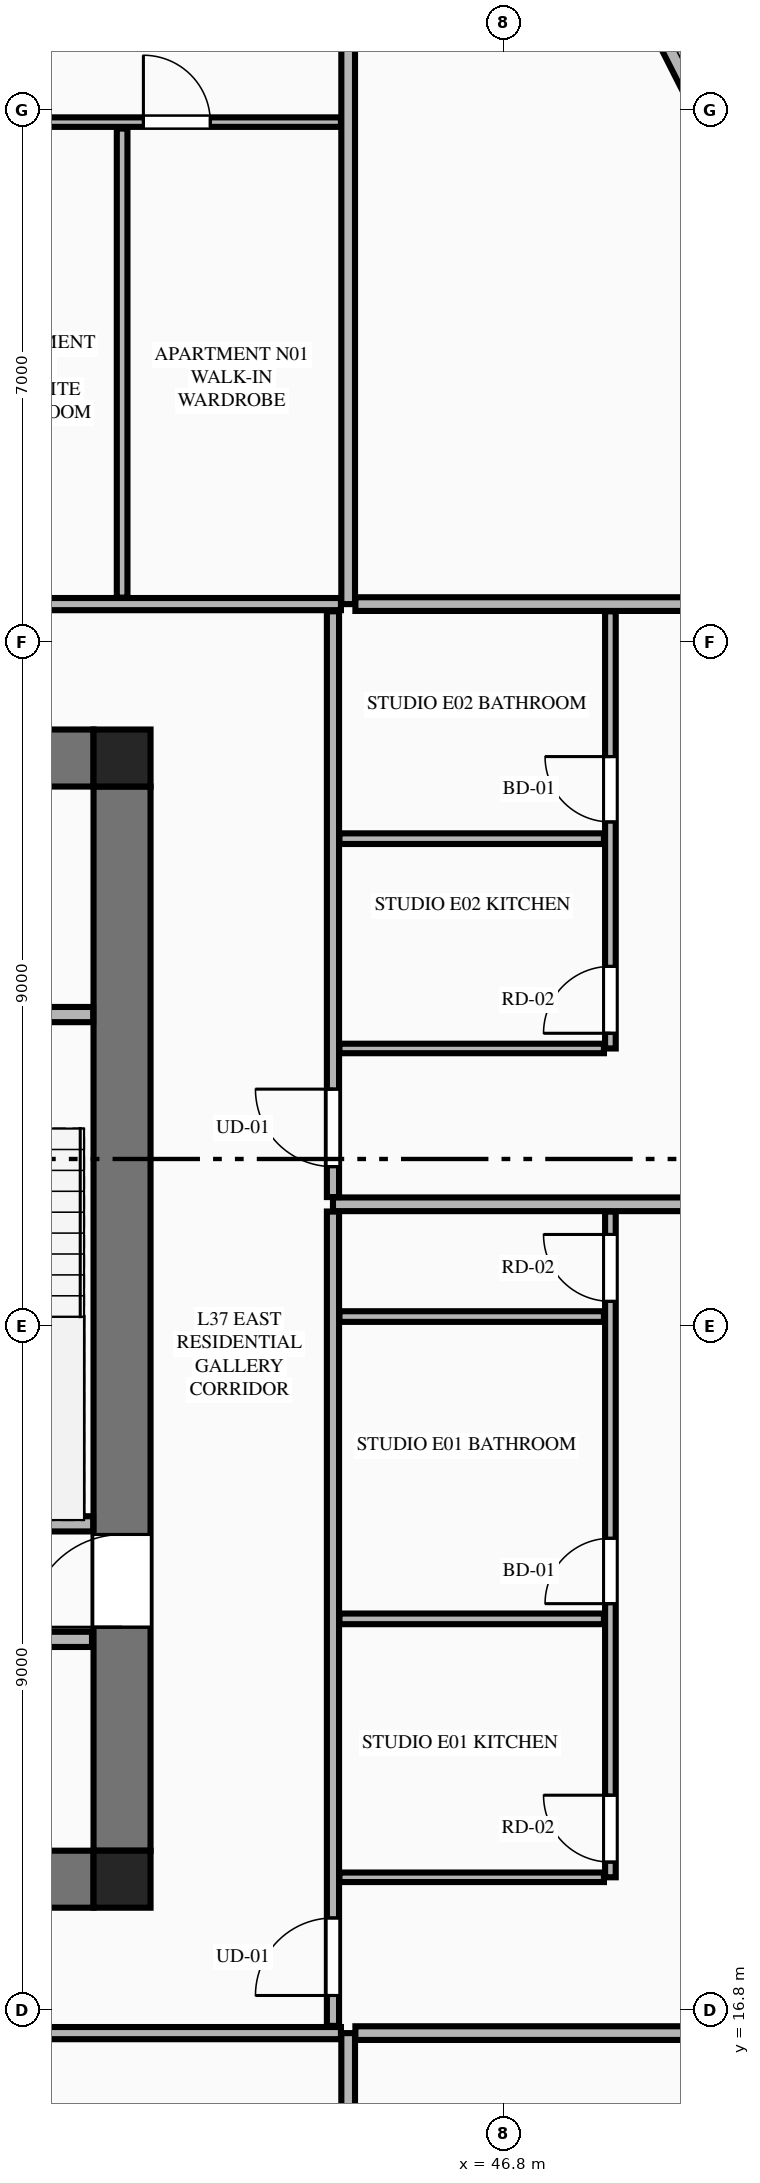
"""IFC4 building model, lengths in metres.
Left out: names, types, materials, properties, quantities, classifications, styles, units other than length and angle.
Written with IfcOpenShell. Run it as: python <this file> out.ifc"""

import sys

from ifc_helpers import new_model, si_unit, direction, frame, frame_2d, origin, origin_2d, place, context, subcontext, project, spatial, rectangle, extrude, element, fill, save


model = new_model("IFC4")
c1 = context("Model", 3, precision=1e-05, world=origin(), true_north=direction((0.0, 1.0)))
c2 = subcontext(c1, "Body", "Model", "MODEL_VIEW")
j1 = project(units=[si_unit("LENGTHUNIT", "METRE"), si_unit("PLANEANGLEUNIT", "RADIAN")], contexts=[c1])
p1 = place(None, origin())
s1 = spatial("IfcSite", under=j1, at=p1, CompositionType="ELEMENT")
p2 = place(p1, origin())
s2 = spatial("IfcBuilding", under=s1, at=p2, CompositionType="ELEMENT")
p3 = place(p2, frame((0.0, 0.0, 141.0)))
s3 = spatial("IfcBuildingStorey", under=s2, at=p3, CompositionType="ELEMENT", Elevation=141.0)
for number, where, z_axis, x_axis in (
    (1, (41.775, 18.525, 0.0), (0.0, 0.0, 1.0), (1.0, 0.0, 0.0)),
    (2, (41.775, 33.275, 0.0), (0.0, 0.0, 1.0), (1.0, 0.0, 0.0)),
):
    element("IfcColumn", number, at=place(p3, frame(where, z_axis=z_axis, x_axis=x_axis)), inside=s3, PredefinedType="COLUMN", context=c2, shape_type="SweptSolid", body=[
        extrude(rectangle(XDim=0.75, YDim=0.75, at=origin_2d()), origin(), (0.0, 0.0, 1.0), 3.55),
    ])
for number, where, z_axis, x_axis in (
    (3, (23.4, 18.525, 0.0), (0.0, 0.0, 1.0), (1.0, 0.0, 0.0)),
    (4, (23.4, 33.275, 0.0), (0.0, 0.0, 1.0), (1.0, 0.0, 0.0)),
):
    element("IfcWall", number, at=place(p3, frame(where, z_axis=z_axis, x_axis=x_axis)), inside=s3, PredefinedType="SHEAR", context=c2, shape_type="SweptSolid", body=[
        extrude(rectangle(XDim=18.0, YDim=0.75, at=frame_2d((9.0, 0.0))), origin(), (0.0, 0.0, 1.0), 3.34),
    ])
p4 = place(p3, frame((41.775, 18.9, 0.0), z_axis=(0.0, 0.0, 1.0), x_axis=(0.0, 1.0, 0.0)))
e5 = element("IfcWall", 5, at=p4, inside=s3, PredefinedType="SHEAR", context=c2, shape_type="SweptSolid", body=[
    extrude(rectangle(XDim=14.0, YDim=0.75, at=frame_2d((7.0, 0.0))), origin(), (0.0, 0.0, 1.0), 3.34),
])
p5 = place(p4, frame((2.94, 0.0, 0.0)))
e6 = element("IfcOpeningElement", 6, at=p5, cuts=e5, PredefinedType="OPENING", context=c2, shape_type="SweptSolid", body=[
    extrude(rectangle(XDim=1.22, YDim=2.25, at=frame_2d((0.61, 1.125))), frame((0.0, 0.385, 0.0), z_axis=(0.0, -1.0, 0.0), x_axis=(1.0, 0.0, 0.0)), (0.0, 0.0, 1.0), 0.77),
])
p6 = place(p3, frame((38.125, 23.2, 0.0), z_axis=(0.0, 0.0, 1.0), x_axis=(1.0, 0.0, 0.0)))
e7 = element("IfcWall", 7, at=p6, inside=s3, PredefinedType="PLUMBINGWALL", context=c2, shape_type="SweptSolid", body=[
    extrude(rectangle(XDim=3.27, YDim=0.2, at=frame_2d((1.635, 0.0))), origin(), (0.0, 0.0, 1.0), 3.34),
])
p7 = place(p3, frame((38.125, 29.9, 0.0), z_axis=(0.0, 0.0, 1.0), x_axis=(1.0, 0.0, 0.0)))
e8 = element("IfcWall", 8, at=p7, inside=s3, PredefinedType="PLUMBINGWALL", context=c2, shape_type="SweptSolid", body=[
    extrude(rectangle(XDim=3.27, YDim=0.2, at=frame_2d((1.635, 0.0))), origin(), (0.0, 0.0, 1.0), 3.34),
])
p8 = place(p7, frame((0.5, 0.0, 0.0)))
e9 = element("IfcOpeningElement", 9, at=p8, cuts=e8, PredefinedType="OPENING", context=c2, shape_type="SweptSolid", body=[
    extrude(rectangle(XDim=0.85, YDim=2.05, at=frame_2d((0.425, 1.025))), frame((0.0, 0.11, 0.0), z_axis=(0.0, -1.0, 0.0), x_axis=(1.0, 0.0, 0.0)), (0.0, 0.0, 1.0), 0.22),
])
p9 = place(p3, frame((23.42, 21.68, 0.0), z_axis=(0.0, 0.0, 1.0), x_axis=(1.0, 0.0, 0.0)))
e10 = element("IfcWall", 10, at=p9, inside=s3, PredefinedType="PLUMBINGWALL", context=c2, shape_type="SweptSolid", body=[
    extrude(rectangle(XDim=17.96, YDim=0.2, at=frame_2d((8.98, 0.0))), origin(), (0.0, 0.0, 1.0), 3.34),
])
p10 = place(p9, frame((11.6, 0.0, 0.0)))
e11 = element("IfcOpeningElement", 11, at=p10, cuts=e10, PredefinedType="OPENING", context=c2, shape_type="SweptSolid", body=[
    extrude(rectangle(XDim=1.1, YDim=2.2, at=frame_2d((0.55, 1.1))), frame((0.0, 0.11, 0.0), z_axis=(0.0, -1.0, 0.0), x_axis=(1.0, 0.0, 0.0)), (0.0, 0.0, 1.0), 0.22),
])
p11 = place(p9, frame((0.41, 0.0, 0.0)))
e12 = element("IfcOpeningElement", 12, at=p11, cuts=e10, PredefinedType="OPENING", context=c2, shape_type="SweptSolid", body=[
    extrude(rectangle(XDim=0.85, YDim=2.05, at=frame_2d((0.425, 1.025))), frame((0.0, 0.11, 0.0), z_axis=(0.0, -1.0, 0.0), x_axis=(1.0, 0.0, 0.0)), (0.0, 0.0, 1.0), 0.22),
])
p12 = place(p9, frame((4.13, 0.0, 0.0)))
e13 = element("IfcOpeningElement", 13, at=p12, cuts=e10, PredefinedType="OPENING", context=c2, shape_type="SweptSolid", body=[
    extrude(rectangle(XDim=0.85, YDim=2.05, at=frame_2d((0.425, 1.025))), frame((0.0, 0.11, 0.0), z_axis=(0.0, -1.0, 0.0), x_axis=(1.0, 0.0, 0.0)), (0.0, 0.0, 1.0), 0.22),
])
p13 = place(p9, frame((7.83, 0.0, 0.0)))
e14 = element("IfcOpeningElement", 14, at=p13, cuts=e10, PredefinedType="OPENING", context=c2, shape_type="SweptSolid", body=[
    extrude(rectangle(XDim=0.85, YDim=2.05, at=frame_2d((0.425, 1.025))), frame((0.0, 0.11, 0.0), z_axis=(0.0, -1.0, 0.0), x_axis=(1.0, 0.0, 0.0)), (0.0, 0.0, 1.0), 0.22),
])
p14 = place(p9, frame((13.78, 0.0, 0.0)))
e15 = element("IfcOpeningElement", 15, at=p14, cuts=e10, PredefinedType="OPENING", context=c2, shape_type="SweptSolid", body=[
    extrude(rectangle(XDim=0.85, YDim=2.05, at=frame_2d((0.425, 1.025))), frame((0.0, 0.11, 0.0), z_axis=(0.0, -1.0, 0.0), x_axis=(1.0, 0.0, 0.0)), (0.0, 0.0, 1.0), 0.22),
])
p15 = place(p9, frame((16.13, 0.0, 0.0)))
e16 = element("IfcOpeningElement", 16, at=p15, cuts=e10, PredefinedType="OPENING", context=c2, shape_type="SweptSolid", body=[
    extrude(rectangle(XDim=0.85, YDim=2.05, at=frame_2d((0.425, 1.025))), frame((0.0, 0.11, 0.0), z_axis=(0.0, -1.0, 0.0), x_axis=(1.0, 0.0, 0.0)), (0.0, 0.0, 1.0), 0.22),
])
p16 = place(p3, frame((50.251, 40.251, 0.0), z_axis=(0.0, 0.0, 1.0), x_axis=(-0.451548465867, 0.892246593142, 0.0)))
e17 = element("IfcWall", 17, at=p16, inside=s3, PredefinedType="STANDARD", context=c2, shape_type="SweptSolid", body=[
    extrude(rectangle(XDim=5.04, YDim=0.34, at=frame_2d((2.52, 0.0))), origin(), (0.0, 0.0, 1.0), 2.797),
])
p17 = place(p16, frame((1.97, 0.0, 0.75)))
e18 = element("IfcOpeningElement", 18, at=p17, cuts=e17, PredefinedType="OPENING", context=c2, shape_type="SweptSolid", body=[
    extrude(rectangle(XDim=1.1, YDim=1.897, at=frame_2d((0.55, 0.948))), frame((0.0, 0.18, 0.0), z_axis=(0.0, -1.0, 0.0), x_axis=(1.0, 0.0, 0.0)), (0.0, 0.0, 1.0), 0.36),
])
p18 = place(p3, frame((44.75, 4.105, 0.0), z_axis=(0.0, 0.0, 1.0), x_axis=(0.0, 1.0, 0.0)))
e19 = element("IfcWall", 19, at=p18, inside=s3, PredefinedType="PARTITIONING", context=c2, shape_type="SweptSolid", body=[
    extrude(rectangle(XDim=12.395, YDim=0.18, at=frame_2d((6.198, 0.0))), origin(), (0.0, 0.0, 1.0), 3.34),
])
p19 = place(p3, frame((20.145, 16.5, 0.0), z_axis=(0.0, 0.0, 1.0), x_axis=(1.0, 0.0, 0.0)))
e20 = element("IfcWall", 20, at=p19, inside=s3, PredefinedType="PARTITIONING", context=c2, shape_type="SweptSolid", body=[
    extrude(rectangle(XDim=24.51, YDim=0.16, at=frame_2d((12.255, 0.0))), origin(), (0.0, 0.0, 1.0), 3.34),
])
p20 = place(p19, frame((0.405, 0.0, 0.0)))
e21 = element("IfcOpeningElement", 21, at=p20, cuts=e20, PredefinedType="OPENING", context=c2, shape_type="SweptSolid", body=[
    extrude(rectangle(XDim=1.35, YDim=2.35, at=frame_2d((0.675, 1.175))), frame((0.0, 0.09, 0.0), z_axis=(0.0, -1.0, 0.0), x_axis=(1.0, 0.0, 0.0)), (0.0, 0.0, 1.0), 0.18),
])
p21 = place(p3, frame((44.75, 35.3, 0.0), z_axis=(0.0, 0.0, 1.0), x_axis=(0.0, 1.0, 0.0)))
e22 = element("IfcWall", 22, at=p21, inside=s3, PredefinedType="PARTITIONING", context=c2, shape_type="SweptSolid", body=[
    extrude(rectangle(XDim=12.195, YDim=0.18, at=frame_2d((6.098, 0.0))), origin(), (0.0, 0.0, 1.0), 3.34),
])
p22 = place(p3, frame((20.145, 35.3, 0.0), z_axis=(0.0, 0.0, 1.0), x_axis=(1.0, 0.0, 0.0)))
e23 = element("IfcWall", 23, at=p22, inside=s3, PredefinedType="PARTITIONING", context=c2, shape_type="SweptSolid", body=[
    extrude(rectangle(XDim=24.51, YDim=0.16, at=frame_2d((12.255, 0.0))), origin(), (0.0, 0.0, 1.0), 3.34),
])
p23 = place(p22, frame((0.405, 0.0, 0.0)))
e24 = element("IfcOpeningElement", 24, at=p23, cuts=e23, PredefinedType="OPENING", context=c2, shape_type="SweptSolid", body=[
    extrude(rectangle(XDim=1.35, YDim=2.35, at=frame_2d((0.675, 1.175))), frame((0.0, 0.09, 0.0), z_axis=(0.0, -1.0, 0.0), x_axis=(1.0, 0.0, 0.0)), (0.0, 0.0, 1.0), 0.18),
])
p24 = place(p3, frame((34.643, 41.641, 0.0), z_axis=(0.0, 0.0, 1.0), x_axis=(1.0, 0.0, 0.0)))
e25 = element("IfcWall", 25, at=p24, inside=s3, PredefinedType="PARTITIONING", context=c2, shape_type="SweptSolid", body=[
    extrude(rectangle(XDim=10.012, YDim=0.125, at=frame_2d((5.006, 0.0))), origin(), (0.0, 0.0, 1.0), 3.34),
])
p25 = place(p24, frame((5.18, 0.0, 0.0)))
e26 = element("IfcOpeningElement", 26, at=p25, cuts=e25, PredefinedType="OPENING", context=c2, shape_type="SweptSolid", body=[
    extrude(rectangle(XDim=0.86, YDim=2.1, at=frame_2d((0.43, 1.05))), frame((0.0, 0.073, 0.0), z_axis=(0.0, -1.0, 0.0), x_axis=(1.0, 0.0, 0.0)), (0.0, 0.0, 1.0), 0.145),
])
p26 = place(p24, frame((7.413, 0.0, 0.0)))
e27 = element("IfcOpeningElement", 27, at=p26, cuts=e25, PredefinedType="OPENING", context=c2, shape_type="SweptSolid", body=[
    extrude(rectangle(XDim=0.88, YDim=2.15, at=frame_2d((0.44, 1.075))), frame((0.0, 0.073, 0.0), z_axis=(0.0, -1.0, 0.0), x_axis=(1.0, 0.0, 0.0)), (0.0, 0.0, 1.0), 0.145),
])
p27 = place(p24, frame((0.3, 0.0, 0.0)))
e28 = element("IfcOpeningElement", 28, at=p27, cuts=e25, PredefinedType="OPENING", context=c2, shape_type="SweptSolid", body=[
    extrude(rectangle(XDim=0.88, YDim=2.15, at=frame_2d((0.44, 1.075))), frame((0.0, 0.073, 0.0), z_axis=(0.0, -1.0, 0.0), x_axis=(1.0, 0.0, 0.0)), (0.0, 0.0, 1.0), 0.145),
])
p28 = place(p3, frame((41.776, 35.385, 0.0), z_axis=(0.0, 0.0, 1.0), x_axis=(0.0, 1.0, 0.0)))
e29 = element("IfcWall", 29, at=p28, inside=s3, PredefinedType="PLUMBINGWALL", context=c2, shape_type="SweptSolid", body=[
    extrude(rectangle(XDim=6.171, YDim=0.14, at=frame_2d((3.085, 0.0))), origin(), (0.0, 0.0, 1.0), 2.722),
])
p29 = place(p3, frame((44.845, 16.5, 0.0), z_axis=(0.0, 0.0, 1.0), x_axis=(1.0, 0.0, 0.0)))
e30 = element("IfcWall", 30, at=p29, inside=s3, PredefinedType="PARTITIONING", context=c2, shape_type="SweptSolid", body=[
    extrude(rectangle(XDim=7.77, YDim=0.18, at=frame_2d((3.885, 0.0))), origin(), (0.0, 0.0, 1.0), 3.34),
])
p30 = place(p3, frame((44.845, 35.3, 0.0), z_axis=(0.0, 0.0, 1.0), x_axis=(1.0, 0.0, 0.0)))
e31 = element("IfcWall", 31, at=p30, inside=s3, PredefinedType="PARTITIONING", context=c2, shape_type="SweptSolid", body=[
    extrude(rectangle(XDim=7.669, YDim=0.18, at=frame_2d((3.834, 0.0))), origin(), (0.0, 0.0, 1.0), 3.34),
])
p31 = place(p3, frame((44.55, 16.595, 0.0), z_axis=(0.0, 0.0, 1.0), x_axis=(0.0, 1.0, 0.0)))
e32 = element("IfcWall", 32, at=p31, inside=s3, PredefinedType="PARTITIONING", context=c2, shape_type="SweptSolid", body=[
    extrude(rectangle(XDim=10.714, YDim=0.16, at=frame_2d((5.357, 0.0))), origin(), (0.0, 0.0, 1.0), 3.34),
])
p32 = place(p31, frame((0.4, 0.0, 0.0)))
e33 = element("IfcOpeningElement", 33, at=p32, cuts=e32, PredefinedType="OPENING", context=c2, shape_type="SweptSolid", body=[
    extrude(rectangle(XDim=1.02, YDim=2.25, at=frame_2d((0.51, 1.125))), frame((0.0, 0.09, 0.0), z_axis=(0.0, -1.0, 0.0), x_axis=(1.0, 0.0, 0.0)), (0.0, 0.0, 1.0), 0.18),
])
p33 = place(p3, frame((44.635, 18.55, 0.0), z_axis=(0.0, 0.0, 1.0), x_axis=(1.0, 0.0, 0.0)))
e34 = element("IfcWall", 34, at=p33, inside=s3, PredefinedType="PARTITIONING", context=c2, shape_type="SweptSolid", body=[
    extrude(rectangle(XDim=3.48, YDim=0.125, at=frame_2d((1.74, 0.0))), origin(), (0.0, 0.0, 1.0), 2.722),
])
p34 = place(p3, frame((48.2, 18.55, 0.0), z_axis=(0.0, 0.0, 1.0), x_axis=(0.0, 1.0, 0.0)))
e35 = element("IfcWall", 35, at=p34, inside=s3, PredefinedType="PLUMBINGWALL", context=c2, shape_type="SweptSolid", body=[
    extrude(rectangle(XDim=8.759, YDim=0.14, at=frame_2d((4.379, 0.0))), origin(), (0.0, 0.0, 1.0), 3.34),
])
p35 = place(p34, frame((3.6, 0.0, 0.0)))
e36 = element("IfcOpeningElement", 36, at=p35, cuts=e35, PredefinedType="OPENING", context=c2, shape_type="SweptSolid", body=[
    extrude(rectangle(XDim=0.86, YDim=2.1, at=frame_2d((0.43, 1.05))), frame((0.0, 0.08, 0.0), z_axis=(0.0, -1.0, 0.0), x_axis=(1.0, 0.0, 0.0)), (0.0, 0.0, 1.0), 0.16),
])
p36 = place(p34, frame((7.577, 0.0, 0.0)))
e37 = element("IfcOpeningElement", 37, at=p36, cuts=e35, PredefinedType="OPENING", context=c2, shape_type="SweptSolid", body=[
    extrude(rectangle(XDim=0.88, YDim=2.15, at=frame_2d((0.44, 1.075))), frame((0.0, 0.08, 0.0), z_axis=(0.0, -1.0, 0.0), x_axis=(1.0, 0.0, 0.0)), (0.0, 0.0, 1.0), 0.16),
])
p37 = place(p34, frame((0.2, 0.0, 0.0)))
e38 = element("IfcOpeningElement", 38, at=p37, cuts=e35, PredefinedType="OPENING", context=c2, shape_type="SweptSolid", body=[
    extrude(rectangle(XDim=0.88, YDim=2.15, at=frame_2d((0.44, 1.075))), frame((0.0, 0.08, 0.0), z_axis=(0.0, -1.0, 0.0), x_axis=(1.0, 0.0, 0.0)), (0.0, 0.0, 1.0), 0.16),
])
for number, where, z_axis, x_axis in (
    (39, (44.635, 21.95, 0.0), (0.0, 0.0, 1.0), (1.0, 0.0, 0.0)),
    (40, (44.635, 25.927, 0.0), (0.0, 0.0, 1.0), (1.0, 0.0, 0.0)),
):
    element("IfcWall", number, at=place(p3, frame(where, z_axis=z_axis, x_axis=x_axis)), inside=s3, PredefinedType="PLUMBINGWALL", context=c2, shape_type="SweptSolid", body=[
        extrude(rectangle(XDim=3.48, YDim=0.14, at=frame_2d((1.74, 0.0))), origin(), (0.0, 0.0, 1.0), 3.34),
    ])
p38 = place(p3, frame((44.55, 27.404, 0.0), z_axis=(0.0, 0.0, 1.0), x_axis=(1.0, 0.0, 0.0)))
e41 = element("IfcWall", 41, at=p38, inside=s3, PredefinedType="PARTITIONING", context=c2, shape_type="SweptSolid", body=[
    extrude(rectangle(XDim=11.959, YDim=0.18, at=frame_2d((5.979, 0.0))), origin(), (0.0, 0.0, 1.0), 3.34),
])
p39 = place(p3, frame((44.55, 27.499, 0.0), z_axis=(0.0, 0.0, 1.0), x_axis=(0.0, 1.0, 0.0)))
e42 = element("IfcWall", 42, at=p39, inside=s3, PredefinedType="PARTITIONING", context=c2, shape_type="SweptSolid", body=[
    extrude(rectangle(XDim=7.706, YDim=0.16, at=frame_2d((3.853, 0.0))), origin(), (0.0, 0.0, 1.0), 3.34),
])
p40 = place(p39, frame((0.4, 0.0, 0.0)))
e43 = element("IfcOpeningElement", 43, at=p40, cuts=e42, PredefinedType="OPENING", context=c2, shape_type="SweptSolid", body=[
    extrude(rectangle(XDim=1.02, YDim=2.25, at=frame_2d((0.51, 1.125))), frame((0.0, 0.09, 0.0), z_axis=(0.0, -1.0, 0.0), x_axis=(1.0, 0.0, 0.0)), (0.0, 0.0, 1.0), 0.18),
])
p41 = place(p3, frame((44.635, 29.454, 0.0), z_axis=(0.0, 0.0, 1.0), x_axis=(1.0, 0.0, 0.0)))
e44 = element("IfcWall", 44, at=p41, inside=s3, PredefinedType="PARTITIONING", context=c2, shape_type="SweptSolid", body=[
    extrude(rectangle(XDim=3.48, YDim=0.125, at=frame_2d((1.74, 0.0))), origin(), (0.0, 0.0, 1.0), 3.34),
])
p42 = place(p3, frame((48.2, 29.454, 0.0), z_axis=(0.0, 0.0, 1.0), x_axis=(0.0, 1.0, 0.0)))
e45 = element("IfcWall", 45, at=p42, inside=s3, PredefinedType="PLUMBINGWALL", context=c2, shape_type="SweptSolid", body=[
    extrude(rectangle(XDim=5.751, YDim=0.14, at=frame_2d((2.875, 0.0))), origin(), (0.0, 0.0, 1.0), 3.34),
])
p43 = place(p42, frame((2.98, 0.0, 0.0)))
e46 = element("IfcOpeningElement", 46, at=p43, cuts=e45, PredefinedType="OPENING", context=c2, shape_type="SweptSolid", body=[
    extrude(rectangle(XDim=0.86, YDim=2.1, at=frame_2d((0.43, 1.05))), frame((0.0, 0.08, 0.0), z_axis=(0.0, -1.0, 0.0), x_axis=(1.0, 0.0, 0.0)), (0.0, 0.0, 1.0), 0.16),
])
p44 = place(p42, frame((0.2, 0.0, 0.0)))
e47 = element("IfcOpeningElement", 47, at=p44, cuts=e45, PredefinedType="OPENING", context=c2, shape_type="SweptSolid", body=[
    extrude(rectangle(XDim=0.88, YDim=2.15, at=frame_2d((0.44, 1.075))), frame((0.0, 0.08, 0.0), z_axis=(0.0, -1.0, 0.0), x_axis=(1.0, 0.0, 0.0)), (0.0, 0.0, 1.0), 0.16),
])
p45 = place(p3, frame((44.635, 32.214, 0.0), z_axis=(0.0, 0.0, 1.0), x_axis=(1.0, 0.0, 0.0)))
e48 = element("IfcWall", 48, at=p45, inside=s3, PredefinedType="PLUMBINGWALL", context=c2, shape_type="SweptSolid", body=[
    extrude(rectangle(XDim=3.48, YDim=0.14, at=frame_2d((1.74, 0.0))), origin(), (0.0, 0.0, 1.0), 3.34),
])
p46 = place(p5, origin())
e49 = element("IfcDoor", 49, at=p46, inside=s3, OperationType="SINGLE_SWING_LEFT", PredefinedType="DOOR", context=c2, shape_type="SweptSolid", body=[
    extrude(rectangle(XDim=1.22, YDim=2.25, at=frame_2d((0.61, 1.125))), frame((0.0, 0.025, 0.0), z_axis=(0.0, -1.0, 0.0), x_axis=(1.0, 0.0, 0.0)), (0.0, 0.0, 1.0), 0.05),
])
fill(e6, e49)
p47 = place(p17, origin())
e50 = element("IfcWindow", 50, at=p47, inside=s3, PartitioningType="SINGLE_PANEL", PredefinedType="WINDOW", context=c2, shape_type="SweptSolid", body=[
    extrude(rectangle(XDim=1.1, YDim=1.897, at=frame_2d((0.55, 0.948))), frame((0.0, 0.03, 0.0), z_axis=(0.0, -1.0, 0.0), x_axis=(1.0, 0.0, 0.0)), (0.0, 0.0, 1.0), 0.06),
])
fill(e18, e50)
p48 = place(p26, origin())
e51 = element("IfcDoor", 51, at=p48, inside=s3, OperationType="SINGLE_SWING_LEFT", PredefinedType="DOOR", context=c2, shape_type="SweptSolid", body=[
    extrude(rectangle(XDim=0.88, YDim=2.15, at=frame_2d((0.44, 1.075))), frame((0.0, 0.025, 0.0), z_axis=(0.0, -1.0, 0.0), x_axis=(1.0, 0.0, 0.0)), (0.0, 0.0, 1.0), 0.05),
])
fill(e27, e51)
p49 = place(p35, origin())
e52 = element("IfcDoor", 52, at=p49, inside=s3, OperationType="SINGLE_SWING_LEFT", PredefinedType="DOOR", context=c2, shape_type="SweptSolid", body=[
    extrude(rectangle(XDim=0.86, YDim=2.1, at=frame_2d((0.43, 1.05))), frame((0.0, 0.025, 0.0), z_axis=(0.0, -1.0, 0.0), x_axis=(1.0, 0.0, 0.0)), (0.0, 0.0, 1.0), 0.05),
])
fill(e36, e52)
p50 = place(p36, origin())
e53 = element("IfcDoor", 53, at=p50, inside=s3, OperationType="SINGLE_SWING_RIGHT", PredefinedType="DOOR", context=c2, shape_type="SweptSolid", body=[
    extrude(rectangle(XDim=0.88, YDim=2.15, at=frame_2d((0.44, 1.075))), frame((0.0, 0.025, 0.0), z_axis=(0.0, -1.0, 0.0), x_axis=(1.0, 0.0, 0.0)), (0.0, 0.0, 1.0), 0.05),
])
fill(e37, e53)
p51 = place(p32, origin())
e54 = element("IfcDoor", 54, at=p51, inside=s3, OperationType="SINGLE_SWING_LEFT", PredefinedType="DOOR", context=c2, shape_type="SweptSolid", body=[
    extrude(rectangle(XDim=1.02, YDim=2.25, at=frame_2d((0.51, 1.125))), frame((0.0, 0.025, 0.0), z_axis=(0.0, -1.0, 0.0), x_axis=(1.0, 0.0, 0.0)), (0.0, 0.0, 1.0), 0.05),
])
fill(e33, e54)
p52 = place(p37, origin())
e55 = element("IfcDoor", 55, at=p52, inside=s3, OperationType="SINGLE_SWING_RIGHT", PredefinedType="DOOR", context=c2, shape_type="SweptSolid", body=[
    extrude(rectangle(XDim=0.88, YDim=2.15, at=frame_2d((0.44, 1.075))), frame((0.0, 0.025, 0.0), z_axis=(0.0, -1.0, 0.0), x_axis=(1.0, 0.0, 0.0)), (0.0, 0.0, 1.0), 0.05),
])
fill(e38, e55)
p53 = place(p43, origin())
e56 = element("IfcDoor", 56, at=p53, inside=s3, OperationType="SINGLE_SWING_RIGHT", PredefinedType="DOOR", context=c2, shape_type="SweptSolid", body=[
    extrude(rectangle(XDim=0.86, YDim=2.1, at=frame_2d((0.43, 1.05))), frame((0.0, 0.025, 0.0), z_axis=(0.0, -1.0, 0.0), x_axis=(1.0, 0.0, 0.0)), (0.0, 0.0, 1.0), 0.05),
])
fill(e46, e56)
p54 = place(p40, origin())
e57 = element("IfcDoor", 57, at=p54, inside=s3, OperationType="SINGLE_SWING_RIGHT", PredefinedType="DOOR", context=c2, shape_type="SweptSolid", body=[
    extrude(rectangle(XDim=1.02, YDim=2.25, at=frame_2d((0.51, 1.125))), frame((0.0, 0.025, 0.0), z_axis=(0.0, -1.0, 0.0), x_axis=(1.0, 0.0, 0.0)), (0.0, 0.0, 1.0), 0.05),
])
fill(e43, e57)
p55 = place(p44, origin())
e58 = element("IfcDoor", 58, at=p55, inside=s3, OperationType="SINGLE_SWING_LEFT", PredefinedType="DOOR", context=c2, shape_type="SweptSolid", body=[
    extrude(rectangle(XDim=0.88, YDim=2.15, at=frame_2d((0.44, 1.075))), frame((0.0, 0.025, 0.0), z_axis=(0.0, -1.0, 0.0), x_axis=(1.0, 0.0, 0.0)), (0.0, 0.0, 1.0), 0.05),
])
fill(e47, e58)
save(model, sys.argv[1])
